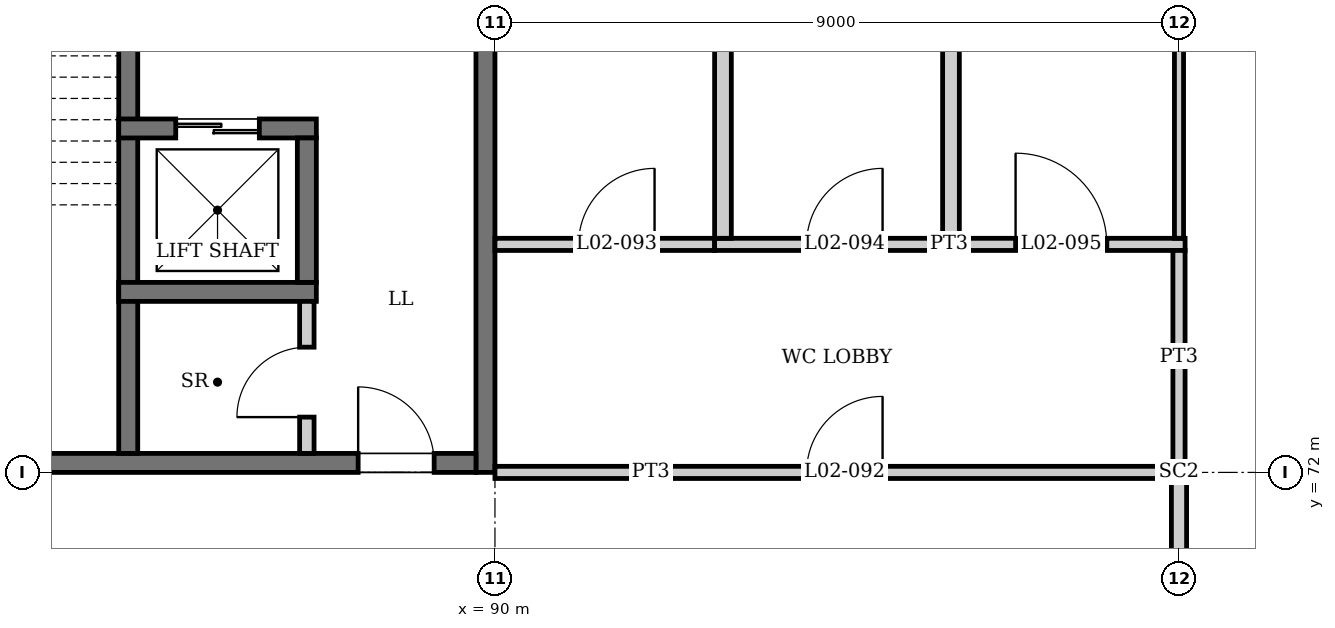
"""IFC4 building model, lengths in metres.
Left out: names, types, materials, properties, quantities, classifications, styles, units other than length and angle.
Written with IfcOpenShell. Run it as: python <this file> out.ifc"""

import sys

from ifc_helpers import new_model, si_unit, direction, frame, frame_2d, origin, origin_2d, place, context, subcontext, project, spatial, rectangle, i_section, extrude, element, fill, save


model = new_model("IFC4")
c1 = context("Model", 3, precision=1e-05, world=origin(), true_north=direction((0.0, 1.0)))
c2 = subcontext(c1, "Body", "Model", "MODEL_VIEW")
j1 = project(units=[si_unit("LENGTHUNIT", "METRE"), si_unit("PLANEANGLEUNIT", "RADIAN")], contexts=[c1])
p1 = place(None, origin())
s1 = spatial("IfcSite", under=j1, at=p1, CompositionType="ELEMENT")
p2 = place(p1, origin())
s2 = spatial("IfcBuilding", under=s1, at=p2, CompositionType="ELEMENT")
p3 = place(p2, frame((0.0, 0.0, 10.5)))
s3 = spatial("IfcBuildingStorey", under=s2, at=p3, CompositionType="ELEMENT", Elevation=10.5)
p4 = place(p3, frame((99.0, 72.0, 0.0), z_axis=(0.0, 0.0, 1.0), x_axis=(0.0, 1.0, 0.0)))
e1 = element("IfcColumn", 1, at=p4, inside=s3, PredefinedType="COLUMN", context=c2, shape_type="SweptSolid", body=[
    extrude(i_section(OverallWidth=0.256, OverallDepth=0.26, WebThickness=0.01, FlangeThickness=0.017, at=origin_2d()), origin(), (0.0, 0.0, 1.0), 4.5),
])
p5 = place(p3, frame((89.875, 72.0, 0.0), z_axis=(0.0, 0.0, 1.0), x_axis=(0.0, 1.0, 0.0)))
e2 = element("IfcWall", 2, at=p5, inside=s3, PredefinedType="SHEAR", context=c2, shape_type="SweptSolid", body=[
    extrude(rectangle(XDim=9.0, YDim=0.25, at=frame_2d((4.5, 0.0))), origin(), (0.0, 0.0, 1.0), 4.35),
])
p6 = place(p3, frame((81.25, 72.125, 0.0), z_axis=(0.0, 0.0, 1.0), x_axis=(1.0, 0.0, 0.0)))
e3 = element("IfcWall", 3, at=p6, inside=s3, PredefinedType="SHEAR", context=c2, shape_type="SweptSolid", body=[
    extrude(rectangle(XDim=8.5, YDim=0.25, at=frame_2d((4.25, 0.0))), origin(), (0.0, 0.0, 1.0), 4.35),
])
p7 = place(p6, frame((6.95, 0.0, 0.0)))
e4 = element("IfcOpeningElement", 4, at=p7, cuts=e3, PredefinedType="OPENING", context=c2, shape_type="SweptSolid", body=[
    extrude(rectangle(XDim=1.0, YDim=2.1, at=frame_2d((0.5, 1.05))), frame((0.0, 0.135, 0.0), z_axis=(0.0, -1.0, 0.0), x_axis=(1.0, 0.0, 0.0)), (0.0, 0.0, 1.0), 0.27),
])
p8 = place(p3, frame((85.175, 80.4, 0.0), z_axis=(0.0, 0.0, 1.0), x_axis=(0.0, -1.0, 0.0)))
e5 = element("IfcWall", 5, at=p8, inside=s3, PredefinedType="SOLIDWALL", context=c2, shape_type="SweptSolid", body=[
    extrude(rectangle(XDim=8.15, YDim=0.25, at=frame_2d((4.075, 0.0))), origin(), (0.0, 0.0, 1.0), 4.35),
])
p9 = place(p8, frame((0.4, 0.0, 0.0)))
e6 = element("IfcOpeningElement", 6, at=p9, cuts=e5, PredefinedType="OPENING", context=c2, shape_type="SweptSolid", body=[
    extrude(rectangle(XDim=1.0, YDim=2.1, at=frame_2d((0.5, 1.05))), frame((0.0, 0.135, 0.0), z_axis=(0.0, -1.0, 0.0), x_axis=(1.0, 0.0, 0.0)), (0.0, 0.0, 1.0), 0.27),
])
p10 = place(p3, frame((85.05, 74.375, 0.0), z_axis=(0.0, 0.0, 1.0), x_axis=(1.0, 0.0, 0.0)))
e7 = element("IfcWall", 7, at=p10, inside=s3, PredefinedType="SOLIDWALL", context=c2, shape_type="SweptSolid", body=[
    extrude(rectangle(XDim=2.6, YDim=0.25, at=frame_2d((1.3, 0.0))), origin(), (0.0, 0.0, 1.0), 4.35),
])
p11 = place(p3, frame((85.05, 76.525, 0.0), z_axis=(0.0, 0.0, 1.0), x_axis=(1.0, 0.0, 0.0)))
e8 = element("IfcWall", 8, at=p11, inside=s3, PredefinedType="SOLIDWALL", context=c2, shape_type="SweptSolid", body=[
    extrude(rectangle(XDim=2.6, YDim=0.25, at=frame_2d((1.3, 0.0))), origin(), (0.0, 0.0, 1.0), 4.35),
])
p12 = place(p11, frame((0.75, 0.0, 0.0)))
e9 = element("IfcOpeningElement", 9, at=p12, cuts=e8, PredefinedType="OPENING", context=c2, shape_type="SweptSolid", body=[
    extrude(rectangle(XDim=1.1, YDim=2.1, at=frame_2d((0.55, 1.05))), frame((0.0, 0.135, 0.0), z_axis=(0.0, -1.0, 0.0), x_axis=(1.0, 0.0, 0.0)), (0.0, 0.0, 1.0), 0.27),
])
p13 = place(p3, frame((87.525, 74.5, 0.0), z_axis=(0.0, 0.0, 1.0), x_axis=(0.0, 1.0, 0.0)))
e10 = element("IfcWall", 10, at=p13, inside=s3, PredefinedType="SOLIDWALL", context=c2, shape_type="SweptSolid", body=[
    extrude(rectangle(XDim=1.9, YDim=0.25, at=frame_2d((0.95, 0.0))), origin(), (0.0, 0.0, 1.0), 4.35),
])
p14 = place(p3, frame((90.0, 72.0, 0.0), z_axis=(0.0, 0.0, 1.0), x_axis=(1.0, 0.0, 0.0)))
e11 = element("IfcWall", 11, at=p14, inside=s3, PredefinedType="PARTITIONING", context=c2, shape_type="SweptSolid", body=[
    extrude(rectangle(XDim=8.87, YDim=0.16, at=frame_2d((4.435, 0.0))), origin(), (0.0, 0.0, 1.0), 3.738),
])
p15 = place(p14, frame((4.1, 0.0, 0.0)))
e12 = element("IfcOpeningElement", 12, at=p15, cuts=e11, PredefinedType="OPENING", context=c2, shape_type="SweptSolid", body=[
    extrude(rectangle(XDim=1.0, YDim=2.1, at=frame_2d((0.5, 1.05))), frame((0.0, 0.09, 0.0), z_axis=(0.0, -1.0, 0.0), x_axis=(1.0, 0.0, 0.0)), (0.0, 0.0, 1.0), 0.18),
])
p16 = place(p3, frame((90.0, 75.0, 0.0), z_axis=(0.0, 0.0, 1.0), x_axis=(1.0, 0.0, 0.0)))
e13 = element("IfcWall", 13, at=p16, inside=s3, PredefinedType="PARTITIONING", context=c2, shape_type="SweptSolid", body=[
    extrude(rectangle(XDim=2.89, YDim=0.16, at=frame_2d((1.445, 0.0))), origin(), (0.0, 0.0, 1.0), 4.35),
])
p17 = place(p16, frame((1.1, 0.0, 0.0)))
e14 = element("IfcOpeningElement", 14, at=p17, cuts=e13, PredefinedType="OPENING", context=c2, shape_type="SweptSolid", body=[
    extrude(rectangle(XDim=1.0, YDim=2.1, at=frame_2d((0.5, 1.05))), frame((0.0, 0.09, 0.0), z_axis=(0.0, -1.0, 0.0), x_axis=(1.0, 0.0, 0.0)), (0.0, 0.0, 1.0), 0.18),
])
p18 = place(p3, frame((92.89, 75.0, 0.0), z_axis=(0.0, 0.0, 1.0), x_axis=(1.0, 0.0, 0.0)))
e15 = element("IfcWall", 15, at=p18, inside=s3, PredefinedType="PARTITIONING", context=c2, shape_type="SweptSolid", body=[
    extrude(rectangle(XDim=6.19, YDim=0.16, at=frame_2d((3.095, 0.0))), origin(), (0.0, 0.0, 1.0), 4.043),
])
p19 = place(p18, frame((1.21, 0.0, 0.0)))
e16 = element("IfcOpeningElement", 16, at=p19, cuts=e15, PredefinedType="OPENING", context=c2, shape_type="SweptSolid", body=[
    extrude(rectangle(XDim=1.0, YDim=2.1, at=frame_2d((0.5, 1.05))), frame((0.0, 0.09, 0.0), z_axis=(0.0, -1.0, 0.0), x_axis=(1.0, 0.0, 0.0)), (0.0, 0.0, 1.0), 0.18),
])
p20 = place(p18, frame((3.96, 0.0, 0.0)))
e17 = element("IfcOpeningElement", 17, at=p20, cuts=e15, PredefinedType="OPENING", context=c2, shape_type="SweptSolid", body=[
    extrude(rectangle(XDim=1.2, YDim=2.1, at=frame_2d((0.6, 1.05))), frame((0.0, 0.09, 0.0), z_axis=(0.0, -1.0, 0.0), x_axis=(1.0, 0.0, 0.0)), (0.0, 0.0, 1.0), 0.18),
])
p21 = place(p3, frame((87.525, 72.25, 0.0), z_axis=(0.0, 0.0, 1.0), x_axis=(0.0, 1.0, 0.0)))
e18 = element("IfcWall", 18, at=p21, inside=s3, PredefinedType="PARTITIONING", context=c2, shape_type="SweptSolid", body=[
    extrude(rectangle(XDim=2.0, YDim=0.19, at=frame_2d((1.0, 0.0))), origin(), (0.0, 0.0, 1.0), 4.35),
])
p22 = place(p21, frame((0.478, 0.0, 0.0)))
e19 = element("IfcOpeningElement", 19, at=p22, cuts=e18, PredefinedType="OPENING", context=c2, shape_type="SweptSolid", body=[
    extrude(rectangle(XDim=0.92, YDim=2.1, at=frame_2d((0.46, 1.05))), frame((0.0, 0.105, 0.0), z_axis=(0.0, -1.0, 0.0), x_axis=(1.0, 0.0, 0.0)), (0.0, 0.0, 1.0), 0.21),
])
for number, where, z_axis, x_axis in (
    (20, (93.0, 75.08, 0.0), (0.0, 0.0, 1.0), (0.0, 1.0, 0.0)),
    (21, (96.0, 75.08, 0.0), (0.0, 0.0, 1.0), (0.0, 1.0, 0.0)),
):
    element("IfcWall", number, at=place(p3, frame(where, z_axis=z_axis, x_axis=x_axis)), inside=s3, PredefinedType="PLUMBINGWALL", context=c2, shape_type="SweptSolid", body=[
        extrude(rectangle(XDim=5.32, YDim=0.22, at=frame_2d((2.66, 0.0))), origin(), (0.0, 0.0, 1.0), 4.35),
    ])
p23 = place(p3, frame((99.0, 54.13, 0.0), z_axis=(0.0, 0.0, 1.0), x_axis=(0.0, 1.0, 0.0)))
e22 = element("IfcWall", 22, at=p23, inside=s3, PredefinedType="PARTITIONING", context=c2, shape_type="SweptSolid", body=[
    extrude(rectangle(XDim=17.74, YDim=0.2, at=frame_2d((8.87, 0.0))), origin(), (0.0, 0.0, 1.0), 3.65),
])
p24 = place(p23, frame((4.97, 0.0, 0.0)))
e23 = element("IfcOpeningElement", 23, at=p24, cuts=e22, PredefinedType="OPENING", context=c2, shape_type="SweptSolid", body=[
    extrude(rectangle(XDim=1.8, YDim=2.1, at=frame_2d((0.9, 1.05))), frame((0.0, 0.11, 0.0), z_axis=(0.0, -1.0, 0.0), x_axis=(1.0, 0.0, 0.0)), (0.0, 0.0, 1.0), 0.22),
])
p25 = place(p23, frame((13.97, 0.0, 0.0)))
e24 = element("IfcOpeningElement", 24, at=p25, cuts=e22, PredefinedType="OPENING", context=c2, shape_type="SweptSolid", body=[
    extrude(rectangle(XDim=1.8, YDim=2.1, at=frame_2d((0.9, 1.05))), frame((0.0, 0.11, 0.0), z_axis=(0.0, -1.0, 0.0), x_axis=(1.0, 0.0, 0.0)), (0.0, 0.0, 1.0), 0.22),
])
p26 = place(p3, frame((99.0, 72.13, 0.0), z_axis=(0.0, 0.0, 1.0), x_axis=(0.0, 1.0, 0.0)))
e25 = element("IfcWall", 25, at=p26, inside=s3, PredefinedType="PARTITIONING", context=c2, shape_type="SweptSolid", body=[
    extrude(rectangle(XDim=2.79, YDim=0.16, at=frame_2d((1.395, 0.0))), origin(), (0.0, 0.0, 1.0), 4.043),
])
p27 = place(p3, frame((99.0, 75.08, 0.0), z_axis=(0.0, 0.0, 1.0), x_axis=(0.0, 1.0, 0.0)))
e26 = element("IfcWall", 26, at=p27, inside=s3, PredefinedType="PARTITIONING", context=c2, shape_type="SweptSolid", body=[
    extrude(rectangle(XDim=5.32, YDim=0.12, at=frame_2d((2.66, 0.0))), origin(), (0.0, 0.0, 1.0), 4.043),
])
p28 = place(p12, origin())
e27 = element("IfcDoor", 27, at=p28, inside=s3, OperationType="DOUBLE_DOOR_SLIDING", PredefinedType="DOOR", context=c2, shape_type="SweptSolid", body=[
    extrude(rectangle(XDim=1.1, YDim=2.1, at=frame_2d((0.55, 1.05))), frame((0.0, 0.025, 0.0), z_axis=(0.0, -1.0, 0.0), x_axis=(1.0, 0.0, 0.0)), (0.0, 0.0, 1.0), 0.05),
])
fill(e9, e27)
p29 = place(p7, origin())
e28 = element("IfcDoor", 28, at=p29, inside=s3, OperationType="SINGLE_SWING_LEFT", PredefinedType="DOOR", context=c2, shape_type="SweptSolid", body=[
    extrude(rectangle(XDim=1.0, YDim=2.1, at=frame_2d((0.5, 1.05))), frame((0.0, 0.025, 0.0), z_axis=(0.0, -1.0, 0.0), x_axis=(1.0, 0.0, 0.0)), (0.0, 0.0, 1.0), 0.05),
])
fill(e4, e28)
p30 = place(p22, origin())
e29 = element("IfcDoor", 29, at=p30, inside=s3, OperationType="SINGLE_SWING_LEFT", PredefinedType="DOOR", context=c2, shape_type="SweptSolid", body=[
    extrude(rectangle(XDim=0.92, YDim=2.1, at=frame_2d((0.46, 1.05))), frame((0.0, 0.025, 0.0), z_axis=(0.0, -1.0, 0.0), x_axis=(1.0, 0.0, 0.0)), (0.0, 0.0, 1.0), 0.05),
])
fill(e19, e29)
p31 = place(p15, origin())
e30 = element("IfcDoor", 30, at=p31, inside=s3, OperationType="SINGLE_SWING_RIGHT", PredefinedType="DOOR", context=c2, shape_type="SweptSolid", body=[
    extrude(rectangle(XDim=1.0, YDim=2.1, at=frame_2d((0.5, 1.05))), frame((0.0, 0.025, 0.0), z_axis=(0.0, -1.0, 0.0), x_axis=(1.0, 0.0, 0.0)), (0.0, 0.0, 1.0), 0.05),
])
fill(e12, e30)
p32 = place(p17, origin())
e31 = element("IfcDoor", 31, at=p32, inside=s3, OperationType="SINGLE_SWING_RIGHT", PredefinedType="DOOR", context=c2, shape_type="SweptSolid", body=[
    extrude(rectangle(XDim=1.0, YDim=2.1, at=frame_2d((0.5, 1.05))), frame((0.0, 0.025, 0.0), z_axis=(0.0, -1.0, 0.0), x_axis=(1.0, 0.0, 0.0)), (0.0, 0.0, 1.0), 0.05),
])
fill(e14, e31)
p33 = place(p19, origin())
e32 = element("IfcDoor", 32, at=p33, inside=s3, OperationType="SINGLE_SWING_RIGHT", PredefinedType="DOOR", context=c2, shape_type="SweptSolid", body=[
    extrude(rectangle(XDim=1.0, YDim=2.1, at=frame_2d((0.5, 1.05))), frame((0.0, 0.025, 0.0), z_axis=(0.0, -1.0, 0.0), x_axis=(1.0, 0.0, 0.0)), (0.0, 0.0, 1.0), 0.05),
])
fill(e16, e32)
p34 = place(p20, origin())
e33 = element("IfcDoor", 33, at=p34, inside=s3, OperationType="SINGLE_SWING_LEFT", PredefinedType="DOOR", context=c2, shape_type="SweptSolid", body=[
    extrude(rectangle(XDim=1.2, YDim=2.1, at=frame_2d((0.6, 1.05))), frame((0.0, 0.025, 0.0), z_axis=(0.0, -1.0, 0.0), x_axis=(1.0, 0.0, 0.0)), (0.0, 0.0, 1.0), 0.05),
])
fill(e17, e33)
save(model, sys.argv[1])
